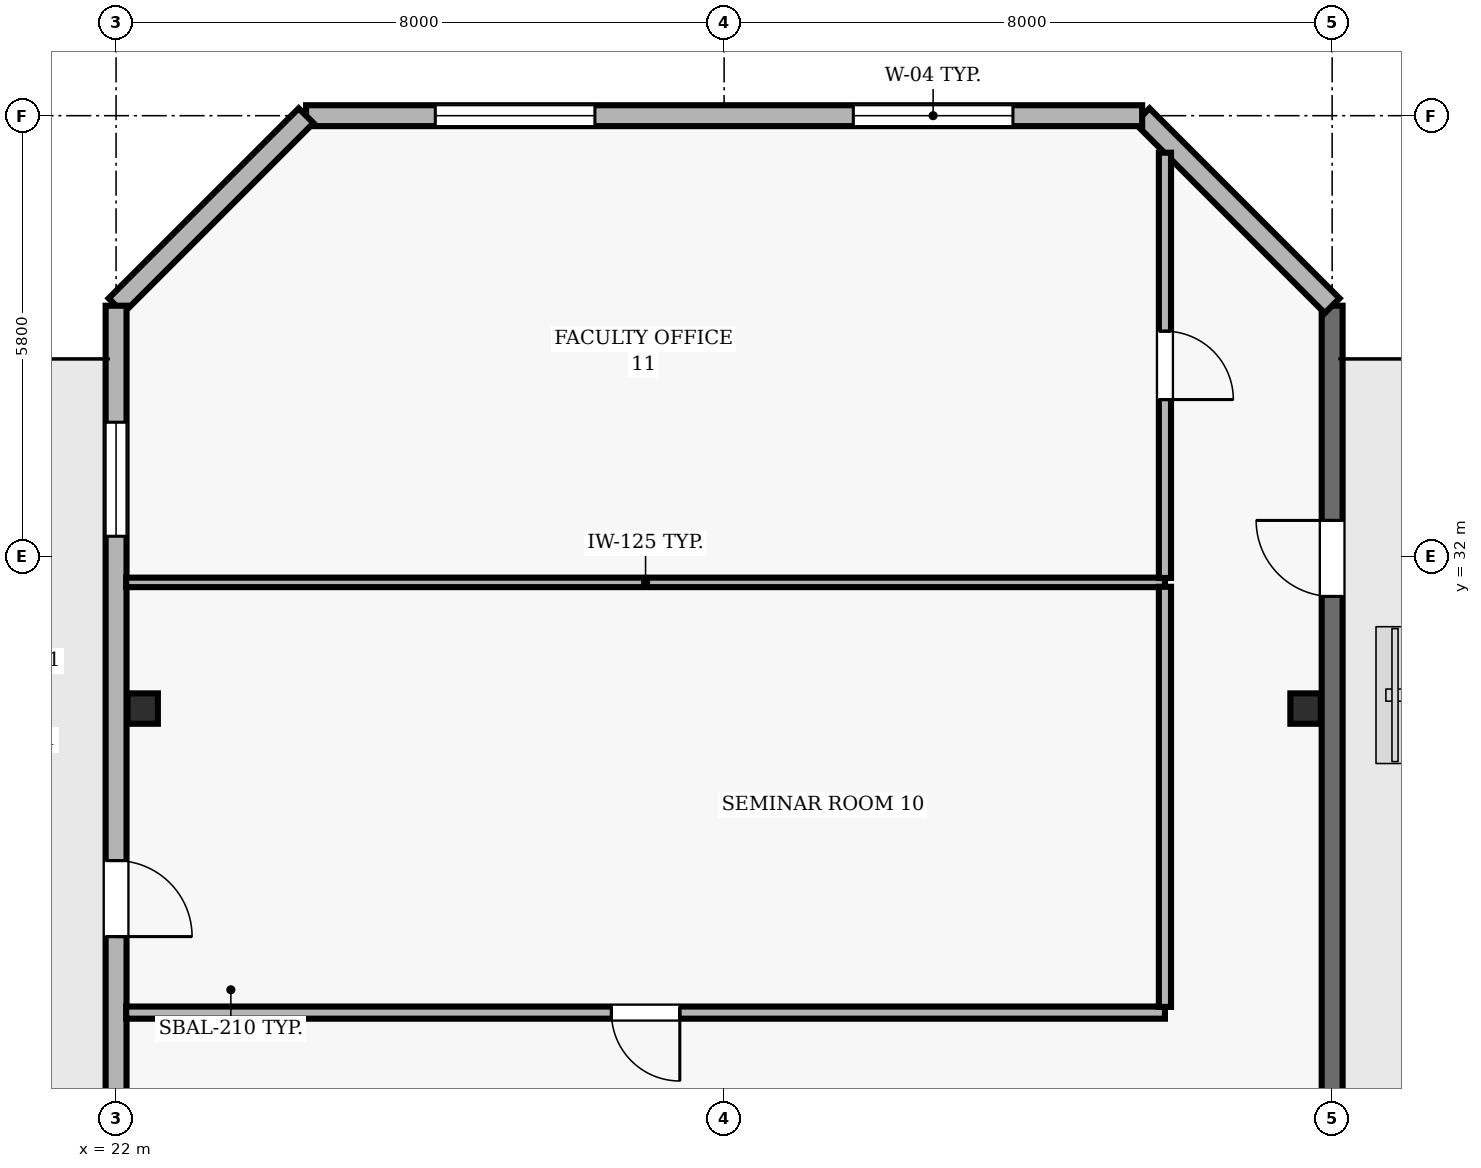
"""IFC4 building model, lengths in metres.
Left out: names, types, materials, properties, quantities, classifications, styles, units other than length and angle.
Written with IfcOpenShell. Run it as: python <this file> out.ifc"""

import sys

from ifc_helpers import new_model, si_unit, direction, frame, frame_2d, origin, origin_2d, place, context, subcontext, project, spatial, rectangle, hollow_rectangle, extrude, element, fill, save


model = new_model("IFC4")
c1 = context("Model", 3, precision=1e-05, world=origin(), true_north=direction((0.0, 1.0)))
c2 = subcontext(c1, "Body", "Model", "MODEL_VIEW")
j1 = project(units=[si_unit("LENGTHUNIT", "METRE"), si_unit("PLANEANGLEUNIT", "RADIAN")], contexts=[c1])
p1 = place(None, origin())
s1 = spatial("IfcSite", under=j1, at=p1, CompositionType="ELEMENT")
p2 = place(p1, origin())
s2 = spatial("IfcBuilding", under=s1, at=p2, CompositionType="ELEMENT")
p3 = place(p2, frame((0.0, 0.0, 267.7)))
s3 = spatial("IfcBuildingStorey", under=s2, at=p3, CompositionType="ELEMENT", Elevation=267.7)
for number, where, z_axis, x_axis in (
    (1, (22.35, 30.0, 0.0), (0.0, 0.0, 1.0), (1.0, 0.0, 0.0)),
    (2, (37.65, 30.0, 0.0), (0.0, 0.0, 1.0), (1.0, 0.0, 0.0)),
):
    element("IfcColumn", number, at=place(p3, frame(where, z_axis=z_axis, x_axis=x_axis)), inside=s3, PredefinedType="COLUMN", context=c2, shape_type="SweptSolid", body=[
        extrude(hollow_rectangle(XDim=0.4, YDim=0.4, WallThickness=0.02, at=origin_2d()), origin(), (0.0, 0.0, 1.0), 3.9),
    ])
p4 = place(p3, frame((38.0, 22.6, 0.0), z_axis=(0.0, 0.0, 1.0), x_axis=(0.0, 1.0, 0.0)))
e3 = element("IfcWall", 3, at=p4, inside=s3, PredefinedType="SOLIDWALL", context=c2, shape_type="SweptSolid", body=[
    extrude(rectangle(XDim=12.7, YDim=0.275, at=frame_2d((6.35, 0.0))), origin(), (0.0, 0.0, 1.0), 3.69),
])
p5 = place(p4, frame((8.875, 0.0, 0.0)))
e4 = element("IfcOpeningElement", 4, at=p5, cuts=e3, PredefinedType="OPENING", context=c2, shape_type="SweptSolid", body=[
    extrude(rectangle(XDim=1.0, YDim=2.2, at=frame_2d((0.5, 1.1))), frame((0.0, 0.147, 0.0), z_axis=(0.0, -1.0, 0.0), x_axis=(1.0, 0.0, 0.0)), (0.0, 0.0, 1.0), 0.295),
])
p6 = place(p3, frame((38.0, 35.3, 0.0), z_axis=(0.0, 0.0, 1.0), x_axis=(-0.707106781187, 0.707106781187, 0.0)))
e5 = element("IfcWall", 5, at=p6, inside=s3, PredefinedType="SOLIDWALL", context=c2, shape_type="SweptSolid", body=[
    extrude(rectangle(XDim=3.536, YDim=0.275, at=frame_2d((1.768, 0.0))), origin(), (0.0, 0.0, 1.0), 3.69),
])
p7 = place(p3, frame((35.5, 37.8, 0.0), z_axis=(0.0, 0.0, 1.0), x_axis=(-1.0, 0.0, 0.0)))
e6 = element("IfcWall", 6, at=p7, inside=s3, PredefinedType="SOLIDWALL", context=c2, shape_type="SweptSolid", body=[
    extrude(rectangle(XDim=11.0, YDim=0.275, at=frame_2d((5.5, 0.0))), origin(), (0.0, 0.0, 1.0), 3.69),
])
p8 = place(p7, frame((1.7, 0.0, 0.9)))
e7 = element("IfcOpeningElement", 7, at=p8, cuts=e6, PredefinedType="OPENING", context=c2, shape_type="SweptSolid", body=[
    extrude(rectangle(XDim=2.1, YDim=1.6, at=frame_2d((1.05, 0.8))), frame((0.0, 0.147, 0.0), z_axis=(0.0, -1.0, 0.0), x_axis=(1.0, 0.0, 0.0)), (0.0, 0.0, 1.0), 0.295),
])
p9 = place(p7, frame((7.2, 0.0, 0.9)))
e8 = element("IfcOpeningElement", 8, at=p9, cuts=e6, PredefinedType="OPENING", context=c2, shape_type="SweptSolid", body=[
    extrude(rectangle(XDim=2.1, YDim=1.6, at=frame_2d((1.05, 0.8))), frame((0.0, 0.147, 0.0), z_axis=(0.0, -1.0, 0.0), x_axis=(1.0, 0.0, 0.0)), (0.0, 0.0, 1.0), 0.295),
])
p10 = place(p3, frame((24.5, 37.8, 0.0), z_axis=(0.0, 0.0, 1.0), x_axis=(-0.707106781187, -0.707106781187, 0.0)))
e9 = element("IfcWall", 9, at=p10, inside=s3, PredefinedType="SOLIDWALL", context=c2, shape_type="SweptSolid", body=[
    extrude(rectangle(XDim=3.536, YDim=0.275, at=frame_2d((1.768, 0.0))), origin(), (0.0, 0.0, 1.0), 3.69),
])
p11 = place(p3, frame((22.0, 35.3, 0.0), z_axis=(0.0, 0.0, 1.0), x_axis=(0.0, -1.0, 0.0)))
e10 = element("IfcWall", 10, at=p11, inside=s3, PredefinedType="SOLIDWALL", context=c2, shape_type="SweptSolid", body=[
    extrude(rectangle(XDim=32.8, YDim=0.275, at=frame_2d((16.4, 0.0))), origin(), (0.0, 0.0, 1.0), 3.69),
])
p12 = place(p11, frame((7.3, 0.0, 0.0)))
e11 = element("IfcOpeningElement", 11, at=p12, cuts=e10, PredefinedType="OPENING", context=c2, shape_type="SweptSolid", body=[
    extrude(rectangle(XDim=1.0, YDim=2.2, at=frame_2d((0.5, 1.1))), frame((0.0, 0.147, 0.0), z_axis=(0.0, -1.0, 0.0), x_axis=(1.0, 0.0, 0.0)), (0.0, 0.0, 1.0), 0.295),
])
p13 = place(p11, frame((1.533, 0.0, 0.9)))
e12 = element("IfcOpeningElement", 12, at=p13, cuts=e10, PredefinedType="OPENING", context=c2, shape_type="SweptSolid", body=[
    extrude(rectangle(XDim=1.5, YDim=1.8, at=frame_2d((0.75, 0.9))), frame((0.0, 0.147, 0.0), z_axis=(0.0, -1.0, 0.0), x_axis=(1.0, 0.0, 0.0)), (0.0, 0.0, 1.0), 0.295),
])
p14 = place(p11, frame((12.917, 0.0, 0.9)))
e13 = element("IfcOpeningElement", 13, at=p14, cuts=e10, PredefinedType="OPENING", context=c2, shape_type="SweptSolid", body=[
    extrude(rectangle(XDim=1.5, YDim=1.8, at=frame_2d((0.75, 0.9))), frame((0.0, 0.147, 0.0), z_axis=(0.0, -1.0, 0.0), x_axis=(1.0, 0.0, 0.0)), (0.0, 0.0, 1.0), 0.295),
])
p15 = place(p11, frame((18.383, 0.0, 0.9)))
e14 = element("IfcOpeningElement", 14, at=p15, cuts=e10, PredefinedType="OPENING", context=c2, shape_type="SweptSolid", body=[
    extrude(rectangle(XDim=1.5, YDim=1.8, at=frame_2d((0.75, 0.9))), frame((0.0, 0.147, 0.0), z_axis=(0.0, -1.0, 0.0), x_axis=(1.0, 0.0, 0.0)), (0.0, 0.0, 1.0), 0.295),
])
p16 = place(p11, frame((23.85, 0.0, 0.9)))
e15 = element("IfcOpeningElement", 15, at=p16, cuts=e10, PredefinedType="OPENING", context=c2, shape_type="SweptSolid", body=[
    extrude(rectangle(XDim=1.5, YDim=1.8, at=frame_2d((0.75, 0.9))), frame((0.0, 0.147, 0.0), z_axis=(0.0, -1.0, 0.0), x_axis=(1.0, 0.0, 0.0)), (0.0, 0.0, 1.0), 0.295),
])
p17 = place(p3, frame((35.8, 26.0, 0.0), z_axis=(0.0, 0.0, 1.0), x_axis=(-1.0, 0.0, 0.0)))
e16 = element("IfcWall", 16, at=p17, inside=s3, PredefinedType="PARTITIONING", context=c2, shape_type="SweptSolid", body=[
    extrude(rectangle(XDim=13.667, YDim=0.16, at=frame_2d((6.833, 0.0))), origin(), (0.0, 0.0, 1.0), 3.69),
])
p18 = place(p17, frame((6.383, 0.0, 0.0)))
e17 = element("IfcOpeningElement", 17, at=p18, cuts=e16, PredefinedType="OPENING", context=c2, shape_type="SweptSolid", body=[
    extrude(rectangle(XDim=0.9, YDim=2.1, at=frame_2d((0.45, 1.05))), frame((0.0, 0.09, 0.0), z_axis=(0.0, -1.0, 0.0), x_axis=(1.0, 0.0, 0.0)), (0.0, 0.0, 1.0), 0.18),
])
p19 = place(p3, frame((35.8, 31.66, 0.0), z_axis=(0.0, 0.0, 1.0), x_axis=(-1.0, 0.0, 0.0)))
e18 = element("IfcWall", 18, at=p19, inside=s3, PredefinedType="PARTITIONING", context=c2, shape_type="SweptSolid", body=[
    extrude(rectangle(XDim=13.667, YDim=0.125, at=frame_2d((6.833, 0.0))), origin(), (0.0, 0.0, 1.0), 3.69),
])
p20 = place(p3, frame((35.8, 31.602, 0.0), z_axis=(0.0, 0.0, 1.0), x_axis=(0.0, -1.0, 0.0)))
e19 = element("IfcWall", 19, at=p20, inside=s3, PredefinedType="PARTITIONING", context=c2, shape_type="SweptSolid", body=[
    extrude(rectangle(XDim=5.527, YDim=0.16, at=frame_2d((2.764, 0.0))), origin(), (0.0, 0.0, 1.0), 3.69),
])
p21 = place(p3, frame((35.8, 37.313, 0.0), z_axis=(0.0, 0.0, 1.0), x_axis=(0.0, -1.0, 0.0)))
e20 = element("IfcWall", 20, at=p21, inside=s3, PredefinedType="PARTITIONING", context=c2, shape_type="SweptSolid", body=[
    extrude(rectangle(XDim=5.595, YDim=0.16, at=frame_2d((2.797, 0.0))), origin(), (0.0, 0.0, 1.0), 3.69),
])
p22 = place(p21, frame((2.348, 0.0, 0.0)))
e21 = element("IfcOpeningElement", 21, at=p22, cuts=e20, PredefinedType="OPENING", context=c2, shape_type="SweptSolid", body=[
    extrude(rectangle(XDim=0.9, YDim=2.1, at=frame_2d((0.45, 1.05))), frame((0.0, 0.09, 0.0), z_axis=(0.0, -1.0, 0.0), x_axis=(1.0, 0.0, 0.0)), (0.0, 0.0, 1.0), 0.18),
])
p23 = place(p5, origin())
e22 = element("IfcDoor", 22, at=p23, inside=s3, OperationType="SINGLE_SWING_RIGHT", PredefinedType="DOOR", context=c2, shape_type="SweptSolid", body=[
    extrude(rectangle(XDim=1.0, YDim=2.2, at=frame_2d((0.5, 1.1))), frame((0.0, 0.025, 0.0), z_axis=(0.0, -1.0, 0.0), x_axis=(1.0, 0.0, 0.0)), (0.0, 0.0, 1.0), 0.05),
])
fill(e4, e22)
p24 = place(p8, origin())
e23 = element("IfcWindow", 23, at=p24, inside=s3, PartitioningType="SINGLE_PANEL", PredefinedType="WINDOW", context=c2, shape_type="SweptSolid", body=[
    extrude(rectangle(XDim=2.1, YDim=1.6, at=frame_2d((1.05, 0.8))), frame((0.0, 0.03, 0.0), z_axis=(0.0, -1.0, 0.0), x_axis=(1.0, 0.0, 0.0)), (0.0, 0.0, 1.0), 0.06),
])
fill(e7, e23)
p25 = place(p9, origin())
e24 = element("IfcWindow", 24, at=p25, inside=s3, PartitioningType="SINGLE_PANEL", PredefinedType="WINDOW", context=c2, shape_type="SweptSolid", body=[
    extrude(rectangle(XDim=2.1, YDim=1.6, at=frame_2d((1.05, 0.8))), frame((0.0, 0.03, 0.0), z_axis=(0.0, -1.0, 0.0), x_axis=(1.0, 0.0, 0.0)), (0.0, 0.0, 1.0), 0.06),
])
fill(e8, e24)
p26 = place(p12, origin())
e25 = element("IfcDoor", 25, at=p26, inside=s3, OperationType="SINGLE_SWING_RIGHT", PredefinedType="DOOR", context=c2, shape_type="SweptSolid", body=[
    extrude(rectangle(XDim=1.0, YDim=2.2, at=frame_2d((0.5, 1.1))), frame((0.0, 0.025, 0.0), z_axis=(0.0, -1.0, 0.0), x_axis=(1.0, 0.0, 0.0)), (0.0, 0.0, 1.0), 0.05),
])
fill(e11, e25)
p27 = place(p13, origin())
e26 = element("IfcWindow", 26, at=p27, inside=s3, PartitioningType="SINGLE_PANEL", PredefinedType="WINDOW", context=c2, shape_type="SweptSolid", body=[
    extrude(rectangle(XDim=1.5, YDim=1.8, at=frame_2d((0.75, 0.9))), frame((0.0, 0.03, 0.0), z_axis=(0.0, -1.0, 0.0), x_axis=(1.0, 0.0, 0.0)), (0.0, 0.0, 1.0), 0.06),
])
fill(e12, e26)
p28 = place(p18, origin())
e27 = element("IfcDoor", 27, at=p28, inside=s3, OperationType="SINGLE_SWING_LEFT", PredefinedType="DOOR", context=c2, shape_type="SweptSolid", body=[
    extrude(rectangle(XDim=0.9, YDim=2.1, at=frame_2d((0.45, 1.05))), frame((0.0, 0.025, 0.0), z_axis=(0.0, -1.0, 0.0), x_axis=(1.0, 0.0, 0.0)), (0.0, 0.0, 1.0), 0.05),
])
fill(e17, e27)
p29 = place(p22, origin())
e28 = element("IfcDoor", 28, at=p29, inside=s3, OperationType="SINGLE_SWING_RIGHT", PredefinedType="DOOR", context=c2, shape_type="SweptSolid", body=[
    extrude(rectangle(XDim=0.9, YDim=2.1, at=frame_2d((0.45, 1.05))), frame((0.0, 0.025, 0.0), z_axis=(0.0, -1.0, 0.0), x_axis=(1.0, 0.0, 0.0)), (0.0, 0.0, 1.0), 0.05),
])
fill(e21, e28)
save(model, sys.argv[1])
